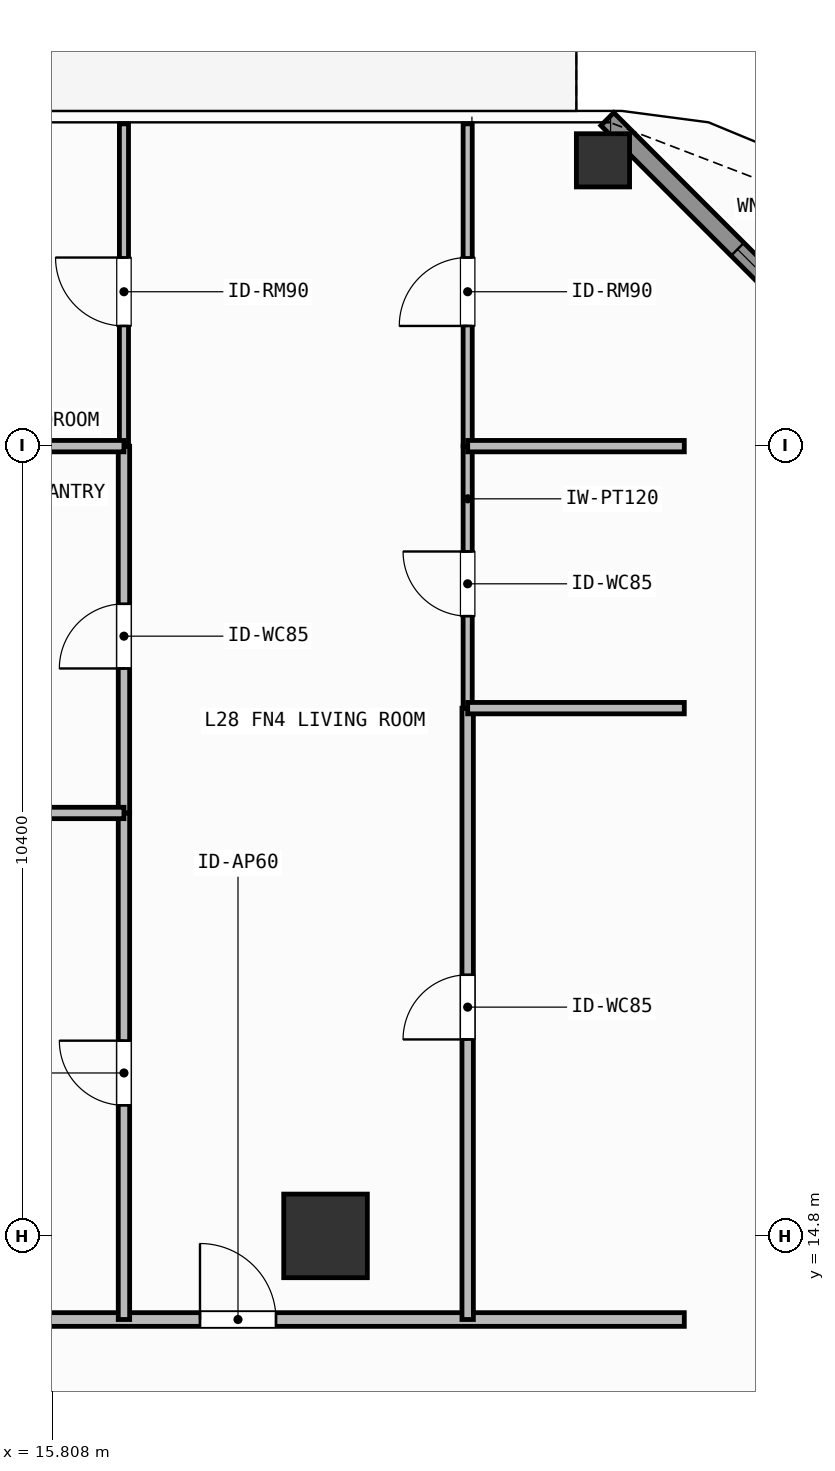
"""IFC4 building model, lengths in metres.
Left out: names, types, materials, properties, quantities, classifications, styles, units other than length and angle.
Written with IfcOpenShell. Run it as: python <this file> out.ifc"""

import sys

from ifc_helpers import new_model, si_unit, direction, frame, frame_2d, origin, origin_2d, place, context, subcontext, project, spatial, rectangle, hollow_rectangle, extrude, element, fill, save


model = new_model("IFC4")
c1 = context("Model", 3, precision=1e-05, world=origin(), true_north=direction((0.0, 1.0)))
c2 = subcontext(c1, "Body", "Model", "MODEL_VIEW")
j1 = project(units=[si_unit("LENGTHUNIT", "METRE"), si_unit("PLANEANGLEUNIT", "RADIAN")], contexts=[c1])
p1 = place(None, origin())
s1 = spatial("IfcSite", under=j1, at=p1, CompositionType="ELEMENT")
p2 = place(p1, origin())
s2 = spatial("IfcBuilding", under=s1, at=p2, CompositionType="ELEMENT")
p3 = place(p2, frame((0.0, 0.0, 113.4)))
s3 = spatial("IfcBuildingStorey", under=s2, at=p3, CompositionType="ELEMENT", Elevation=113.4)
p4 = place(p3, frame((19.4, 14.8, 0.0), z_axis=(0.0, 0.0, 1.0), x_axis=(1.0, 0.0, 0.0)))
e1 = element("IfcColumn", 1, at=p4, inside=s3, PredefinedType="COLUMN", context=c2, shape_type="SweptSolid", body=[
    extrude(rectangle(XDim=1.1, YDim=1.1, at=origin_2d()), origin(), (0.0, 0.0, 1.0), 3.9),
])
p5 = place(p3, frame((23.05, 28.95, 0.0), z_axis=(0.0, 0.0, 1.0), x_axis=(1.0, 0.0, 0.0)))
e2 = element("IfcColumn", 2, at=p5, inside=s3, PredefinedType="COLUMN", context=c2, shape_type="SweptSolid", body=[
    extrude(hollow_rectangle(XDim=0.7, YDim=0.7, WallThickness=0.032, at=origin_2d()), origin(), (0.0, 0.0, 1.0), 3.9),
])
p6 = place(p3, frame((23.108, 29.492, 0.0), z_axis=(0.0, 0.0, 1.0), x_axis=(0.707087534163, -0.707126027686, 0.0)))
e3 = element("IfcWall", 3, at=p6, inside=s3, PredefinedType="SOLIDWALL", context=c2, shape_type="SweptSolid", body=[
    extrude(rectangle(XDim=6.342, YDim=0.24, at=frame_2d((3.171, 0.0))), origin(), (0.0, 0.0, 1.0), 3.68),
])
p7 = place(p6, frame((2.421, 0.0, 0.8)))
e4 = element("IfcOpeningElement", 4, at=p7, cuts=e3, PredefinedType="OPENING", context=c2, shape_type="SweptSolid", body=[
    extrude(rectangle(XDim=1.5, YDim=1.85, at=frame_2d((0.75, 0.925))), frame((0.0, 0.13, 0.0), z_axis=(0.0, -1.0, 0.0), x_axis=(1.0, 0.0, 0.0)), (0.0, 0.0, 1.0), 0.26),
])
p8 = place(p3, frame((12.736, 13.7, 0.0), z_axis=(0.0, 0.0, 1.0), x_axis=(1.0, 0.0, 0.0)))
e5 = element("IfcWall", 5, at=p8, inside=s3, PredefinedType="PARTITIONING", context=c2, shape_type="SweptSolid", body=[
    extrude(rectangle(XDim=11.384, YDim=0.18, at=frame_2d((5.692, 0.0))), origin(), (0.0, 0.0, 1.0), 3.68),
])
p9 = place(p8, frame((5.012, 0.0, 0.0)))
e6 = element("IfcOpeningElement", 6, at=p9, cuts=e5, PredefinedType="OPENING", context=c2, shape_type="SweptSolid", body=[
    extrude(rectangle(XDim=1.0, YDim=2.2, at=frame_2d((0.5, 1.1))), frame((0.0, 0.1, 0.0), z_axis=(0.0, -1.0, 0.0), x_axis=(1.0, 0.0, 0.0)), (0.0, 0.0, 1.0), 0.2),
])
p10 = place(p3, frame((16.748, 13.7, 0.0), z_axis=(0.0, 0.0, 1.0), x_axis=(0.0, 1.0, 0.0)))
e7 = element("IfcWall", 7, at=p10, inside=s3, PredefinedType="PARTITIONING", context=c2, shape_type="SweptSolid", body=[
    extrude(rectangle(XDim=6.664, YDim=0.15, at=frame_2d((3.332, 0.0))), origin(), (0.0, 0.0, 1.0), 3.68),
])
p11 = place(p10, frame((2.818, 0.0, 0.0)))
e8 = element("IfcOpeningElement", 8, at=p11, cuts=e7, PredefinedType="OPENING", context=c2, shape_type="SweptSolid", body=[
    extrude(rectangle(XDim=0.85, YDim=2.1, at=frame_2d((0.425, 1.05))), frame((0.0, 0.085, 0.0), z_axis=(0.0, -1.0, 0.0), x_axis=(1.0, 0.0, 0.0)), (0.0, 0.0, 1.0), 0.17),
])
p12 = place(p3, frame((16.748, 20.364, 0.0), z_axis=(0.0, 0.0, 1.0), x_axis=(0.0, 1.0, 0.0)))
e9 = element("IfcWall", 9, at=p12, inside=s3, PredefinedType="PARTITIONING", context=c2, shape_type="SweptSolid", body=[
    extrude(rectangle(XDim=4.826, YDim=0.15, at=frame_2d((2.413, 0.0))), origin(), (0.0, 0.0, 1.0), 3.68),
])
p13 = place(p12, frame((1.901, 0.0, 0.0)))
e10 = element("IfcOpeningElement", 10, at=p13, cuts=e9, PredefinedType="OPENING", context=c2, shape_type="SweptSolid", body=[
    extrude(rectangle(XDim=0.85, YDim=2.1, at=frame_2d((0.425, 1.05))), frame((0.0, 0.085, 0.0), z_axis=(0.0, -1.0, 0.0), x_axis=(1.0, 0.0, 0.0)), (0.0, 0.0, 1.0), 0.17),
])
p14 = place(p3, frame((16.748, 25.19, 0.0), z_axis=(0.0, 0.0, 1.0), x_axis=(0.0, 1.0, 0.0)))
e11 = element("IfcWall", 11, at=p14, inside=s3, PredefinedType="PARTITIONING", context=c2, shape_type="SweptSolid", body=[
    extrude(rectangle(XDim=4.24, YDim=0.12, at=frame_2d((2.12, 0.0))), origin(), (0.0, 0.0, 1.0), 3.68),
])
p15 = place(p14, frame((1.581, 0.0, 0.0)))
e12 = element("IfcOpeningElement", 12, at=p15, cuts=e11, PredefinedType="OPENING", context=c2, shape_type="SweptSolid", body=[
    extrude(rectangle(XDim=0.9, YDim=2.1, at=frame_2d((0.45, 1.05))), frame((0.0, 0.07, 0.0), z_axis=(0.0, -1.0, 0.0), x_axis=(1.0, 0.0, 0.0)), (0.0, 0.0, 1.0), 0.14),
])
p16 = place(p3, frame((21.27, 13.7, 0.0), z_axis=(0.0, 0.0, 1.0), x_axis=(0.0, 1.0, 0.0)))
e13 = element("IfcWall", 13, at=p16, inside=s3, PredefinedType="PARTITIONING", context=c2, shape_type="SweptSolid", body=[
    extrude(rectangle(XDim=8.043, YDim=0.15, at=frame_2d((4.021, 0.0))), origin(), (0.0, 0.0, 1.0), 3.68),
])
p17 = place(p16, frame((3.685, 0.0, 0.0)))
e14 = element("IfcOpeningElement", 14, at=p17, cuts=e13, PredefinedType="OPENING", context=c2, shape_type="SweptSolid", body=[
    extrude(rectangle(XDim=0.85, YDim=2.1, at=frame_2d((0.425, 1.05))), frame((0.0, 0.085, 0.0), z_axis=(0.0, -1.0, 0.0), x_axis=(1.0, 0.0, 0.0)), (0.0, 0.0, 1.0), 0.17),
])
p18 = place(p3, frame((21.27, 21.743, 0.0), z_axis=(0.0, 0.0, 1.0), x_axis=(0.0, 1.0, 0.0)))
e15 = element("IfcWall", 15, at=p18, inside=s3, PredefinedType="PARTITIONING", context=c2, shape_type="SweptSolid", body=[
    extrude(rectangle(XDim=3.447, YDim=0.12, at=frame_2d((1.724, 0.0))), origin(), (0.0, 0.0, 1.0), 3.68),
])
p19 = place(p18, frame((1.211, 0.0, 0.0)))
e16 = element("IfcOpeningElement", 16, at=p19, cuts=e15, PredefinedType="OPENING", context=c2, shape_type="SweptSolid", body=[
    extrude(rectangle(XDim=0.85, YDim=2.1, at=frame_2d((0.425, 1.05))), frame((0.0, 0.07, 0.0), z_axis=(0.0, -1.0, 0.0), x_axis=(1.0, 0.0, 0.0)), (0.0, 0.0, 1.0), 0.14),
])
p20 = place(p3, frame((21.27, 25.19, 0.0), z_axis=(0.0, 0.0, 1.0), x_axis=(0.0, 1.0, 0.0)))
e17 = element("IfcWall", 17, at=p20, inside=s3, PredefinedType="PARTITIONING", context=c2, shape_type="SweptSolid", body=[
    extrude(rectangle(XDim=4.24, YDim=0.12, at=frame_2d((2.12, 0.0))), origin(), (0.0, 0.0, 1.0), 3.68),
])
p21 = place(p20, frame((1.581, 0.0, 0.0)))
e18 = element("IfcOpeningElement", 18, at=p21, cuts=e17, PredefinedType="OPENING", context=c2, shape_type="SweptSolid", body=[
    extrude(rectangle(XDim=0.9, YDim=2.1, at=frame_2d((0.45, 1.05))), frame((0.0, 0.07, 0.0), z_axis=(0.0, -1.0, 0.0), x_axis=(1.0, 0.0, 0.0)), (0.0, 0.0, 1.0), 0.14),
])
p22 = place(p3, frame((12.736, 20.364, 0.0), z_axis=(0.0, 0.0, 1.0), x_axis=(1.0, 0.0, 0.0)))
e19 = element("IfcWall", 19, at=p22, inside=s3, PredefinedType="PARTITIONING", context=c2, shape_type="SweptSolid", body=[
    extrude(rectangle(XDim=4.012, YDim=0.15, at=frame_2d((2.006, 0.0))), origin(), (0.0, 0.0, 1.0), 3.082),
])
p23 = place(p3, frame((12.736, 25.19, 0.0), z_axis=(0.0, 0.0, 1.0), x_axis=(1.0, 0.0, 0.0)))
e20 = element("IfcWall", 20, at=p23, inside=s3, PredefinedType="PARTITIONING", context=c2, shape_type="SweptSolid", body=[
    extrude(rectangle(XDim=4.012, YDim=0.15, at=frame_2d((2.006, 0.0))), origin(), (0.0, 0.0, 1.0), 3.68),
])
p24 = place(p3, frame((21.27, 21.743, 0.0), z_axis=(0.0, 0.0, 1.0), x_axis=(1.0, 0.0, 0.0)))
e21 = element("IfcWall", 21, at=p24, inside=s3, PredefinedType="PARTITIONING", context=c2, shape_type="SweptSolid", body=[
    extrude(rectangle(XDim=2.85, YDim=0.15, at=frame_2d((1.425, 0.0))), origin(), (0.0, 0.0, 1.0), 3.37),
])
p25 = place(p3, frame((21.27, 25.19, 0.0), z_axis=(0.0, 0.0, 1.0), x_axis=(1.0, 0.0, 0.0)))
e22 = element("IfcWall", 22, at=p25, inside=s3, PredefinedType="PARTITIONING", context=c2, shape_type="SweptSolid", body=[
    extrude(rectangle(XDim=2.85, YDim=0.15, at=frame_2d((1.425, 0.0))), origin(), (0.0, 0.0, 1.0), 3.68),
])
p26 = place(p7, origin())
e23 = element("IfcWindow", 23, at=p26, inside=s3, PartitioningType="SINGLE_PANEL", PredefinedType="WINDOW", context=c2, shape_type="SweptSolid", body=[
    extrude(rectangle(XDim=1.5, YDim=1.85, at=frame_2d((0.75, 0.925))), frame((0.0, 0.03, 0.0), z_axis=(0.0, -1.0, 0.0), x_axis=(1.0, 0.0, 0.0)), (0.0, 0.0, 1.0), 0.06),
])
fill(e4, e23)
p27 = place(p9, origin())
e24 = element("IfcDoor", 24, at=p27, inside=s3, OperationType="SINGLE_SWING_LEFT", PredefinedType="DOOR", context=c2, shape_type="SweptSolid", body=[
    extrude(rectangle(XDim=1.0, YDim=2.2, at=frame_2d((0.5, 1.1))), frame((0.0, 0.025, 0.0), z_axis=(0.0, -1.0, 0.0), x_axis=(1.0, 0.0, 0.0)), (0.0, 0.0, 1.0), 0.05),
])
fill(e6, e24)
p28 = place(p11, origin())
e25 = element("IfcDoor", 25, at=p28, inside=s3, OperationType="SINGLE_SWING_RIGHT", PredefinedType="DOOR", context=c2, shape_type="SweptSolid", body=[
    extrude(rectangle(XDim=0.85, YDim=2.1, at=frame_2d((0.425, 1.05))), frame((0.0, 0.025, 0.0), z_axis=(0.0, -1.0, 0.0), x_axis=(1.0, 0.0, 0.0)), (0.0, 0.0, 1.0), 0.05),
])
fill(e8, e25)
p29 = place(p13, origin())
e26 = element("IfcDoor", 26, at=p29, inside=s3, OperationType="SINGLE_SWING_LEFT", PredefinedType="DOOR", context=c2, shape_type="SweptSolid", body=[
    extrude(rectangle(XDim=0.85, YDim=2.1, at=frame_2d((0.425, 1.05))), frame((0.0, 0.025, 0.0), z_axis=(0.0, -1.0, 0.0), x_axis=(1.0, 0.0, 0.0)), (0.0, 0.0, 1.0), 0.05),
])
fill(e10, e26)
p30 = place(p15, origin())
e27 = element("IfcDoor", 27, at=p30, inside=s3, OperationType="SINGLE_SWING_RIGHT", PredefinedType="DOOR", context=c2, shape_type="SweptSolid", body=[
    extrude(rectangle(XDim=0.9, YDim=2.1, at=frame_2d((0.45, 1.05))), frame((0.0, 0.025, 0.0), z_axis=(0.0, -1.0, 0.0), x_axis=(1.0, 0.0, 0.0)), (0.0, 0.0, 1.0), 0.05),
])
fill(e12, e27)
p31 = place(p17, origin())
e28 = element("IfcDoor", 28, at=p31, inside=s3, OperationType="SINGLE_SWING_LEFT", PredefinedType="DOOR", context=c2, shape_type="SweptSolid", body=[
    extrude(rectangle(XDim=0.85, YDim=2.1, at=frame_2d((0.425, 1.05))), frame((0.0, 0.025, 0.0), z_axis=(0.0, -1.0, 0.0), x_axis=(1.0, 0.0, 0.0)), (0.0, 0.0, 1.0), 0.05),
])
fill(e14, e28)
p32 = place(p19, origin())
e29 = element("IfcDoor", 29, at=p32, inside=s3, OperationType="SINGLE_SWING_RIGHT", PredefinedType="DOOR", context=c2, shape_type="SweptSolid", body=[
    extrude(rectangle(XDim=0.85, YDim=2.1, at=frame_2d((0.425, 1.05))), frame((0.0, 0.025, 0.0), z_axis=(0.0, -1.0, 0.0), x_axis=(1.0, 0.0, 0.0)), (0.0, 0.0, 1.0), 0.05),
])
fill(e16, e29)
p33 = place(p21, origin())
e30 = element("IfcDoor", 30, at=p33, inside=s3, OperationType="SINGLE_SWING_LEFT", PredefinedType="DOOR", context=c2, shape_type="SweptSolid", body=[
    extrude(rectangle(XDim=0.9, YDim=2.1, at=frame_2d((0.45, 1.05))), frame((0.0, 0.025, 0.0), z_axis=(0.0, -1.0, 0.0), x_axis=(1.0, 0.0, 0.0)), (0.0, 0.0, 1.0), 0.05),
])
fill(e18, e30)
save(model, sys.argv[1])
